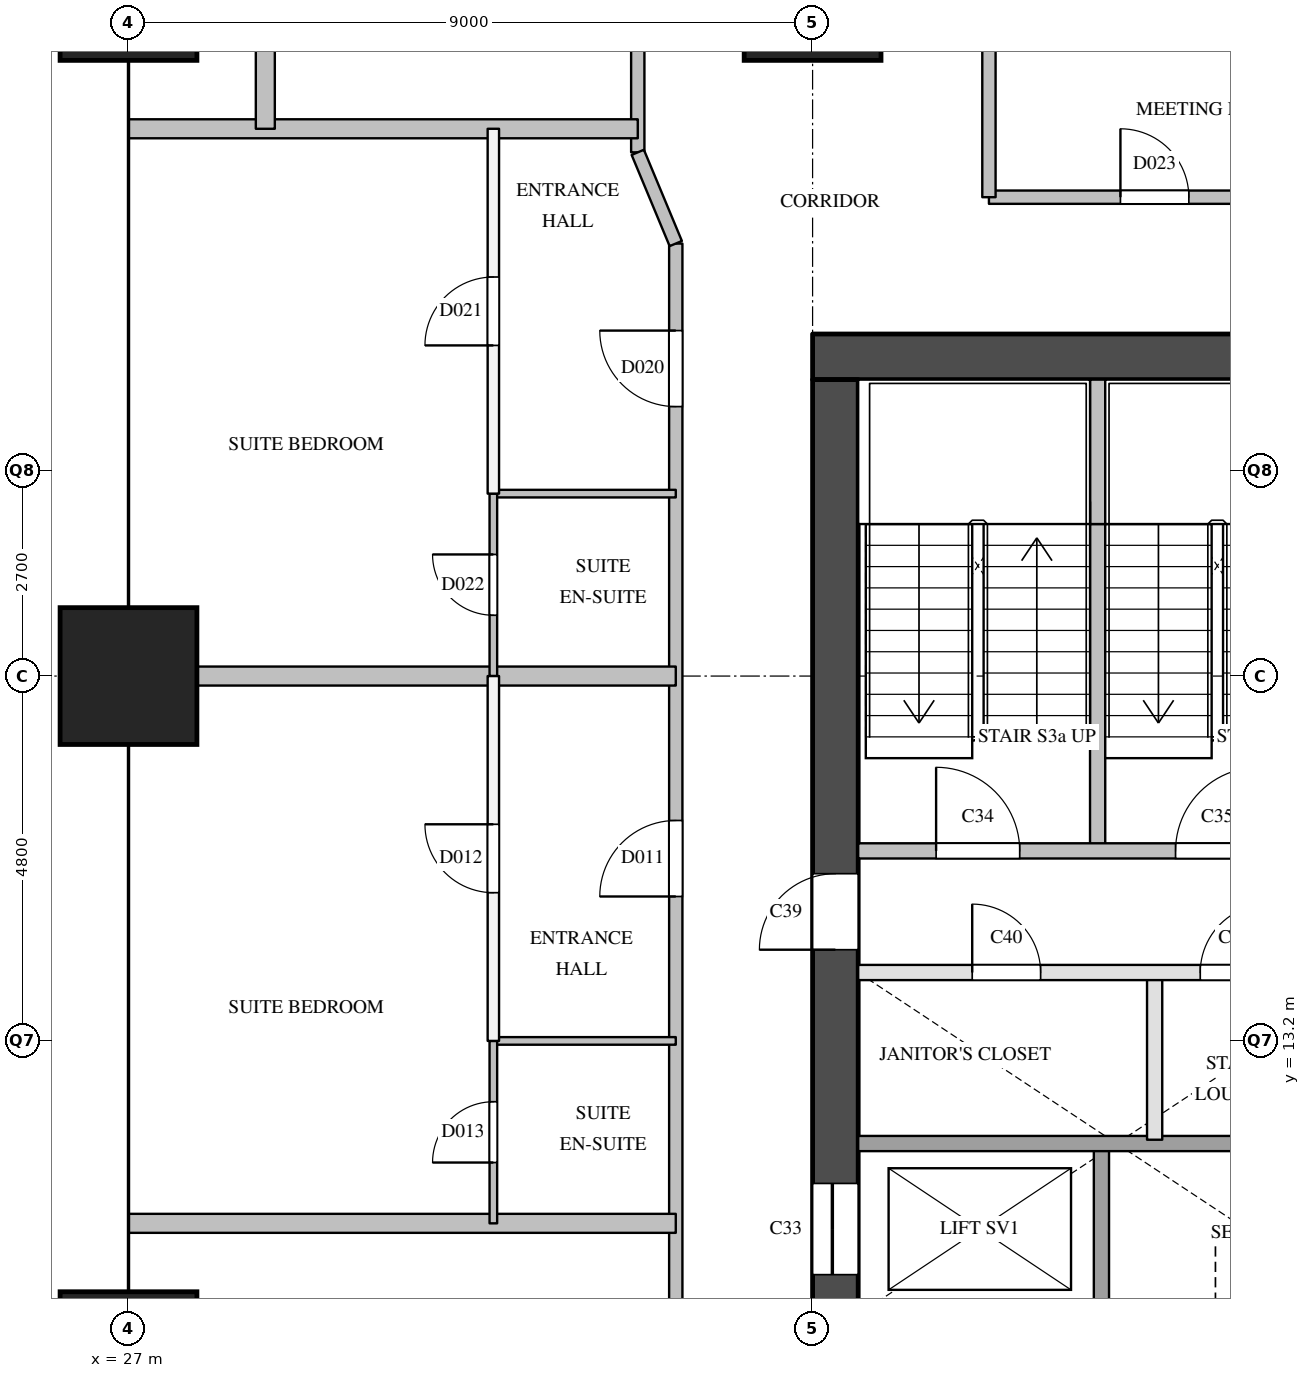
"""IFC4 building model, lengths in metres.
Left out: names, types, materials, properties, quantities, classifications, styles, units other than length and angle.
Written with IfcOpenShell. Run it as: python <this file> out.ifc"""

import sys

from ifc_helpers import new_model, si_unit, direction, frame, frame_2d, origin, origin_2d, place, context, subcontext, project, spatial, rectangle, extrude, element, fill, save


model = new_model("IFC4")
c1 = context("Model", 3, precision=1e-05, world=origin(), true_north=direction((0.0, 1.0)))
c2 = subcontext(c1, "Body", "Model", "MODEL_VIEW")
j1 = project(units=[si_unit("LENGTHUNIT", "METRE"), si_unit("PLANEANGLEUNIT", "RADIAN")], contexts=[c1])
p1 = place(None, origin())
s1 = spatial("IfcSite", under=j1, at=p1, CompositionType="ELEMENT")
p2 = place(p1, origin())
s2 = spatial("IfcBuilding", under=s1, at=p2, CompositionType="ELEMENT")
p3 = place(p2, frame((0.0, 0.0, 112.0)))
s3 = spatial("IfcBuildingStorey", under=s2, at=p3, CompositionType="ELEMENT", Elevation=112.0)
for number, where, z_axis, x_axis in (
    (1, (27.0, 9.0, 0.0), (0.0, 0.0, 1.0), (1.0, 0.0, 0.0)),
    (2, (27.0, 18.0, 0.0), (0.0, 0.0, 1.0), (1.0, 0.0, 0.0)),
    (3, (27.0, 27.0, 0.0), (0.0, 0.0, 1.0), (1.0, 0.0, 0.0)),
    (4, (36.0, 27.0, 0.0), (0.0, 0.0, 1.0), (1.0, 0.0, 0.0)),
):
    element("IfcColumn", number, at=place(p3, frame(where, z_axis=z_axis, x_axis=x_axis)), inside=s3, PredefinedType="COLUMN", context=c2, shape_type="SweptSolid", body=[
        extrude(rectangle(XDim=1.8, YDim=1.8, at=origin_2d()), origin(), (0.0, 0.0, 1.0), 3.8),
    ])
p4 = place(p3, frame((36.0, 22.2, 0.0), z_axis=(0.0, 0.0, 1.0), x_axis=(1.0, 0.0, 0.0)))
e5 = element("IfcWall", 5, at=p4, inside=s3, PredefinedType="SHEAR", context=c2, shape_type="SweptSolid", body=[
    extrude(rectangle(XDim=9.0, YDim=0.6, at=frame_2d((4.5, 0.0))), origin(), (0.0, 0.0, 1.0), 3.5),
])
p5 = place(p3, frame((36.3, 9.6, 0.0), z_axis=(0.0, 0.0, 1.0), x_axis=(0.0, 1.0, 0.0)))
e6 = element("IfcWall", 6, at=p5, inside=s3, PredefinedType="SHEAR", context=c2, shape_type="SweptSolid", body=[
    extrude(rectangle(XDim=12.3, YDim=0.6, at=frame_2d((6.15, 0.0))), origin(), (0.0, 0.0, 1.0), 3.5),
])
p6 = place(p5, frame((0.525, 0.0, 0.0)))
e7 = element("IfcOpeningElement", 7, at=p6, cuts=e6, PredefinedType="OPENING", context=c2, shape_type="SweptSolid", body=[
    extrude(rectangle(XDim=1.2, YDim=2.1, at=frame_2d((0.6, 1.05))), frame((0.0, 0.31, 0.0), z_axis=(0.0, -1.0, 0.0), x_axis=(1.0, 0.0, 0.0)), (0.0, 0.0, 1.0), 0.62),
])
p7 = place(p5, frame((4.8, 0.0, 0.0)))
e8 = element("IfcOpeningElement", 8, at=p7, cuts=e6, PredefinedType="OPENING", context=c2, shape_type="SweptSolid", body=[
    extrude(rectangle(XDim=1.0, YDim=2.1, at=frame_2d((0.5, 1.05))), frame((0.0, 0.31, 0.0), z_axis=(0.0, -1.0, 0.0), x_axis=(1.0, 0.0, 0.0)), (0.0, 0.0, 1.0), 0.62),
])
p8 = place(p3, frame((39.75, 15.7, 0.0), z_axis=(0.0, 0.0, 1.0), x_axis=(0.0, 1.0, 0.0)))
e9 = element("IfcWall", 9, at=p8, inside=s3, PredefinedType="SOLIDWALL", context=c2, shape_type="SweptSolid", body=[
    extrude(rectangle(XDim=4.3, YDim=0.2, at=frame_2d((2.15, 0.0))), origin(), (0.0, 0.0, 1.0), 3.5),
])
p9 = place(p3, frame((39.75, 20.0, 0.0), z_axis=(0.0, 0.0, 1.0), x_axis=(0.0, 1.0, 0.0)))
e10 = element("IfcWall", 10, at=p9, inside=s3, PredefinedType="SOLIDWALL", context=c2, shape_type="SweptSolid", body=[
    extrude(rectangle(XDim=1.9, YDim=0.2, at=frame_2d((0.95, 0.0))), origin(), (0.0, 0.0, 1.0), 3.5),
])
p10 = place(p3, frame((39.8, 9.6, 0.0), z_axis=(0.0, 0.0, 1.0), x_axis=(0.0, 1.0, 0.0)))
e11 = element("IfcWall", 11, at=p10, inside=s3, PredefinedType="SOLIDWALL", context=c2, shape_type="SweptSolid", body=[
    extrude(rectangle(XDim=2.3, YDim=0.2, at=frame_2d((1.15, 0.0))), origin(), (0.0, 0.0, 1.0), 3.5),
])
p11 = place(p3, frame((40.5, 11.9, 0.0), z_axis=(0.0, 0.0, 1.0), x_axis=(0.0, 1.0, 0.0)))
e12 = element("IfcWall", 12, at=p11, inside=s3, PredefinedType="PARTITIONING", context=c2, shape_type="SweptSolid", body=[
    extrude(rectangle(XDim=2.2, YDim=0.2, at=frame_2d((1.1, 0.0))), origin(), (0.0, 0.0, 1.0), 3.5),
])
p12 = place(p3, frame((36.6, 11.85, 0.0), z_axis=(0.0, 0.0, 1.0), x_axis=(1.0, 0.0, 0.0)))
e13 = element("IfcWall", 13, at=p12, inside=s3, PredefinedType="SOLIDWALL", context=c2, shape_type="SweptSolid", body=[
    extrude(rectangle(XDim=7.8, YDim=0.2, at=frame_2d((3.9, 0.0))), origin(), (0.0, 0.0, 1.0), 3.5),
])
p13 = place(p3, frame((36.6, 14.1, 0.0), z_axis=(0.0, 0.0, 1.0), x_axis=(1.0, 0.0, 0.0)))
e14 = element("IfcWall", 14, at=p13, inside=s3, PredefinedType="PARTITIONING", context=c2, shape_type="SweptSolid", body=[
    extrude(rectangle(XDim=6.0, YDim=0.2, at=frame_2d((3.0, 0.0))), origin(), (0.0, 0.0, 1.0), 3.5),
])
p14 = place(p13, frame((1.5, 0.0, 0.0)))
e15 = element("IfcOpeningElement", 15, at=p14, cuts=e14, PredefinedType="OPENING", context=c2, shape_type="SweptSolid", body=[
    extrude(rectangle(XDim=0.9, YDim=2.1, at=frame_2d((0.45, 1.05))), frame((0.0, 0.11, 0.0), z_axis=(0.0, -1.0, 0.0), x_axis=(1.0, 0.0, 0.0)), (0.0, 0.0, 1.0), 0.22),
])
p15 = place(p13, frame((4.5, 0.0, 0.0)))
e16 = element("IfcOpeningElement", 16, at=p15, cuts=e14, PredefinedType="OPENING", context=c2, shape_type="SweptSolid", body=[
    extrude(rectangle(XDim=0.9, YDim=2.1, at=frame_2d((0.45, 1.05))), frame((0.0, 0.11, 0.0), z_axis=(0.0, -1.0, 0.0), x_axis=(1.0, 0.0, 0.0)), (0.0, 0.0, 1.0), 0.22),
])
p16 = place(p3, frame((36.6, 15.7, 0.0), z_axis=(0.0, 0.0, 1.0), x_axis=(1.0, 0.0, 0.0)))
e17 = element("IfcWall", 17, at=p16, inside=s3, PredefinedType="SOLIDWALL", context=c2, shape_type="SweptSolid", body=[
    extrude(rectangle(XDim=6.3, YDim=0.2, at=frame_2d((3.15, 0.0))), origin(), (0.0, 0.0, 1.0), 3.5),
])
p17 = place(p16, frame((1.025, 0.0, 0.0)))
e18 = element("IfcOpeningElement", 18, at=p17, cuts=e17, PredefinedType="OPENING", context=c2, shape_type="SweptSolid", body=[
    extrude(rectangle(XDim=1.1, YDim=2.1, at=frame_2d((0.55, 1.05))), frame((0.0, 0.11, 0.0), z_axis=(0.0, -1.0, 0.0), x_axis=(1.0, 0.0, 0.0)), (0.0, 0.0, 1.0), 0.22),
])
p18 = place(p16, frame((4.175, 0.0, 0.0)))
e19 = element("IfcOpeningElement", 19, at=p18, cuts=e17, PredefinedType="OPENING", context=c2, shape_type="SweptSolid", body=[
    extrude(rectangle(XDim=1.1, YDim=2.1, at=frame_2d((0.55, 1.05))), frame((0.0, 0.11, 0.0), z_axis=(0.0, -1.0, 0.0), x_axis=(1.0, 0.0, 0.0)), (0.0, 0.0, 1.0), 0.22),
])
p19 = place(p3, frame((38.32, 24.3, 0.0), z_axis=(0.0, 0.0, 1.0), x_axis=(1.0, 0.0, 0.0)))
e20 = element("IfcWall", 20, at=p19, inside=s3, PredefinedType="PARTITIONING", context=c2, shape_type="SweptSolid", body=[
    extrude(rectangle(XDim=4.36, YDim=0.175, at=frame_2d((2.18, 0.0))), origin(), (0.0, 0.0, 1.0), 3.5),
])
p20 = place(p19, frame((1.73, 0.0, 0.0)))
e21 = element("IfcOpeningElement", 21, at=p20, cuts=e20, PredefinedType="OPENING", context=c2, shape_type="SweptSolid", body=[
    extrude(rectangle(XDim=0.9, YDim=2.1, at=frame_2d((0.45, 1.05))), frame((0.0, 0.097, 0.0), z_axis=(0.0, -1.0, 0.0), x_axis=(1.0, 0.0, 0.0)), (0.0, 0.0, 1.0), 0.195),
])
p21 = place(p3, frame((33.7, 24.89, 0.0), z_axis=(0.0, 0.0, 1.0), x_axis=(0.0, 1.0, 0.0)))
e22 = element("IfcWall", 22, at=p21, inside=s3, PredefinedType="PARTITIONING", context=c2, shape_type="SweptSolid", body=[
    extrude(rectangle(XDim=3.03, YDim=0.175, at=frame_2d((1.515, 0.0))), origin(), (0.0, 0.0, 1.0), 2.5),
])
p22 = place(p3, frame((34.2, 7.2, 0.0), z_axis=(0.0, 0.0, 1.0), x_axis=(0.0, 1.0, 0.0)))
e23 = element("IfcWall", 23, at=p22, inside=s3, PredefinedType="PARTITIONING", context=c2, shape_type="SweptSolid", body=[
    extrude(rectangle(XDim=16.49, YDim=0.175, at=frame_2d((8.245, 0.0))), origin(), (0.0, 0.0, 1.0), 3.5),
])
p23 = place(p22, frame((1.35, 0.0, 0.0)))
e24 = element("IfcOpeningElement", 24, at=p23, cuts=e23, PredefinedType="OPENING", context=c2, shape_type="SweptSolid", body=[
    extrude(rectangle(XDim=0.9, YDim=2.1, at=frame_2d((0.45, 1.05))), frame((0.0, 0.097, 0.0), z_axis=(0.0, -1.0, 0.0), x_axis=(1.0, 0.0, 0.0)), (0.0, 0.0, 1.0), 0.195),
])
p24 = place(p22, frame((7.9, 0.0, 0.0)))
e25 = element("IfcOpeningElement", 25, at=p24, cuts=e23, PredefinedType="OPENING", context=c2, shape_type="SweptSolid", body=[
    extrude(rectangle(XDim=1.0, YDim=2.1, at=frame_2d((0.5, 1.05))), frame((0.0, 0.097, 0.0), z_axis=(0.0, -1.0, 0.0), x_axis=(1.0, 0.0, 0.0)), (0.0, 0.0, 1.0), 0.195),
])
p25 = place(p22, frame((14.345, 0.0, 0.0)))
e26 = element("IfcOpeningElement", 26, at=p25, cuts=e23, PredefinedType="OPENING", context=c2, shape_type="SweptSolid", body=[
    extrude(rectangle(XDim=1.0, YDim=2.1, at=frame_2d((0.5, 1.05))), frame((0.0, 0.097, 0.0), z_axis=(0.0, -1.0, 0.0), x_axis=(1.0, 0.0, 0.0)), (0.0, 0.0, 1.0), 0.195),
])
p26 = place(p3, frame((38.32, 24.3, 0.0), z_axis=(0.0, 0.0, 1.0), x_axis=(0.0, 1.0, 0.0)))
e27 = element("IfcWall", 27, at=p26, inside=s3, PredefinedType="PARTITIONING", context=c2, shape_type="SweptSolid", body=[
    extrude(rectangle(XDim=2.4, YDim=0.175, at=frame_2d((1.2, 0.0))), origin(), (0.0, 0.0, 1.0), 2.5),
])
p27 = place(p3, frame((31.8, 13.2, 0.0), z_axis=(0.0, 0.0, 1.0), x_axis=(0.0, 1.0, 0.0)))
e28 = element("IfcWall", 28, at=p27, inside=s3, PredefinedType="PARTITIONING", context=c2, shape_type="SweptSolid", body=[
    extrude(rectangle(XDim=4.8, YDim=0.15, at=frame_2d((2.4, 0.0))), origin(), (0.0, 0.0, 1.0), 3.5),
])
p28 = place(p27, frame((1.95, 0.0, 0.0)))
e29 = element("IfcOpeningElement", 29, at=p28, cuts=e28, PredefinedType="OPENING", context=c2, shape_type="SweptSolid", body=[
    extrude(rectangle(XDim=0.9, YDim=2.1, at=frame_2d((0.45, 1.05))), frame((0.0, 0.085, 0.0), z_axis=(0.0, -1.0, 0.0), x_axis=(1.0, 0.0, 0.0)), (0.0, 0.0, 1.0), 0.17),
])
p29 = place(p3, frame((31.8, 20.4, 0.0), z_axis=(0.0, 0.0, 1.0), x_axis=(0.0, 1.0, 0.0)))
e30 = element("IfcWall", 30, at=p29, inside=s3, PredefinedType="PARTITIONING", context=c2, shape_type="SweptSolid", body=[
    extrude(rectangle(XDim=4.8, YDim=0.15, at=frame_2d((2.4, 0.0))), origin(), (0.0, 0.0, 1.0), 3.5),
])
p30 = place(p29, frame((1.95, 0.0, 0.0)))
e31 = element("IfcOpeningElement", 31, at=p30, cuts=e30, PredefinedType="OPENING", context=c2, shape_type="SweptSolid", body=[
    extrude(rectangle(XDim=0.9, YDim=2.1, at=frame_2d((0.45, 1.05))), frame((0.0, 0.085, 0.0), z_axis=(0.0, -1.0, 0.0), x_axis=(1.0, 0.0, 0.0)), (0.0, 0.0, 1.0), 0.17),
])
p31 = place(p3, frame((27.0, 10.8, 0.0), z_axis=(0.0, 0.0, 1.0), x_axis=(1.0, 0.0, 0.0)))
e32 = element("IfcWall", 32, at=p31, inside=s3, PredefinedType="PARTITIONING", context=c2, shape_type="SweptSolid", body=[
    extrude(rectangle(XDim=7.2, YDim=0.25, at=frame_2d((3.6, 0.0))), origin(), (0.0, 0.0, 1.0), 2.5),
])
p32 = place(p3, frame((27.0, 18.0, 0.0), z_axis=(0.0, 0.0, 1.0), x_axis=(1.0, 0.0, 0.0)))
e33 = element("IfcWall", 33, at=p32, inside=s3, PredefinedType="PARTITIONING", context=c2, shape_type="SweptSolid", body=[
    extrude(rectangle(XDim=7.2, YDim=0.25, at=frame_2d((3.6, 0.0))), origin(), (0.0, 0.0, 1.0), 3.5),
])
p33 = place(p3, frame((27.0, 25.2, 0.0), z_axis=(0.0, 0.0, 1.0), x_axis=(1.0, 0.0, 0.0)))
e34 = element("IfcWall", 34, at=p33, inside=s3, PredefinedType="PARTITIONING", context=c2, shape_type="SweptSolid", body=[
    extrude(rectangle(XDim=6.7, YDim=0.25, at=frame_2d((3.35, 0.0))), origin(), (0.0, 0.0, 1.0), 2.5),
])
p34 = place(p3, frame((28.8, 25.2, 0.0), z_axis=(0.0, 0.0, 1.0), x_axis=(0.0, 1.0, 0.0)))
e35 = element("IfcWall", 35, at=p34, inside=s3, PredefinedType="PARTITIONING", context=c2, shape_type="SweptSolid", body=[
    extrude(rectangle(XDim=10.8, YDim=0.25, at=frame_2d((5.4, 0.0))), origin(), (0.0, 0.0, 1.0), 2.5),
])
for number, where, z_axis, x_axis in (
    (36, (31.8, 13.2, 0.0), (0.0, 0.0, 1.0), (1.0, 0.0, 0.0)),
    (37, (31.8, 20.4, 0.0), (0.0, 0.0, 1.0), (1.0, 0.0, 0.0)),
):
    element("IfcWall", number, at=place(p3, frame(where, z_axis=z_axis, x_axis=x_axis)), inside=s3, PredefinedType="PARTITIONING", context=c2, shape_type="SweptSolid", body=[
        extrude(rectangle(XDim=2.4, YDim=0.1, at=frame_2d((1.2, 0.0))), origin(), (0.0, 0.0, 1.0), 3.5),
    ])
p35 = place(p3, frame((31.8, 10.8, 0.0), z_axis=(0.0, 0.0, 1.0), x_axis=(0.0, 1.0, 0.0)))
e38 = element("IfcWall", 38, at=p35, inside=s3, PredefinedType="PARTITIONING", context=c2, shape_type="SweptSolid", body=[
    extrude(rectangle(XDim=2.4, YDim=0.1, at=frame_2d((1.2, 0.0))), origin(), (0.0, 0.0, 1.0), 3.5),
])
p36 = place(p35, frame((0.8, 0.0, 0.0)))
e39 = element("IfcOpeningElement", 39, at=p36, cuts=e38, PredefinedType="OPENING", context=c2, shape_type="SweptSolid", body=[
    extrude(rectangle(XDim=0.8, YDim=2.1, at=frame_2d((0.4, 1.05))), frame((0.0, 0.06, 0.0), z_axis=(0.0, -1.0, 0.0), x_axis=(1.0, 0.0, 0.0)), (0.0, 0.0, 1.0), 0.12),
])
p37 = place(p3, frame((31.8, 18.0, 0.0), z_axis=(0.0, 0.0, 1.0), x_axis=(0.0, 1.0, 0.0)))
e40 = element("IfcWall", 40, at=p37, inside=s3, PredefinedType="PARTITIONING", context=c2, shape_type="SweptSolid", body=[
    extrude(rectangle(XDim=2.4, YDim=0.1, at=frame_2d((1.2, 0.0))), origin(), (0.0, 0.0, 1.0), 3.5),
])
p38 = place(p37, frame((0.8, 0.0, 0.0)))
e41 = element("IfcOpeningElement", 41, at=p38, cuts=e40, PredefinedType="OPENING", context=c2, shape_type="SweptSolid", body=[
    extrude(rectangle(XDim=0.8, YDim=2.1, at=frame_2d((0.4, 1.05))), frame((0.0, 0.06, 0.0), z_axis=(0.0, -1.0, 0.0), x_axis=(1.0, 0.0, 0.0)), (0.0, 0.0, 1.0), 0.12),
])
p39 = place(p3, frame((34.2, 23.69, 0.0), z_axis=(0.0, 0.0, 1.0), x_axis=(-0.384628719983, 0.923071366561, 0.0)))
e42 = element("IfcWall", 42, at=p39, inside=s3, PredefinedType="PARTITIONING", context=c2, shape_type="SweptSolid", body=[
    extrude(rectangle(XDim=1.3, YDim=0.175, at=frame_2d((0.65, 0.0))), origin(), (0.0, 0.0, 1.0), 3.5),
])
p40 = place(p6, origin())
e43 = element("IfcDoor", 43, at=p40, inside=s3, OperationType="SLIDING_TO_LEFT", PredefinedType="DOOR", context=c2, shape_type="SweptSolid", body=[
    extrude(rectangle(XDim=1.2, YDim=2.1, at=frame_2d((0.6, 1.05))), frame((0.0, 0.025, 0.0), z_axis=(0.0, -1.0, 0.0), x_axis=(1.0, 0.0, 0.0)), (0.0, 0.0, 1.0), 0.05),
])
fill(e7, e43)
p41 = place(p17, origin())
e44 = element("IfcDoor", 44, at=p41, inside=s3, OperationType="SINGLE_SWING_LEFT", PredefinedType="DOOR", context=c2, shape_type="SweptSolid", body=[
    extrude(rectangle(XDim=1.1, YDim=2.1, at=frame_2d((0.55, 1.05))), frame((0.0, 0.025, 0.0), z_axis=(0.0, -1.0, 0.0), x_axis=(1.0, 0.0, 0.0)), (0.0, 0.0, 1.0), 0.05),
])
fill(e18, e44)
p42 = place(p18, origin())
e45 = element("IfcDoor", 45, at=p42, inside=s3, OperationType="SINGLE_SWING_RIGHT", PredefinedType="DOOR", context=c2, shape_type="SweptSolid", body=[
    extrude(rectangle(XDim=1.1, YDim=2.1, at=frame_2d((0.55, 1.05))), frame((0.0, 0.025, 0.0), z_axis=(0.0, -1.0, 0.0), x_axis=(1.0, 0.0, 0.0)), (0.0, 0.0, 1.0), 0.05),
])
fill(e19, e45)
p43 = place(p7, origin())
e46 = element("IfcDoor", 46, at=p43, inside=s3, OperationType="SINGLE_SWING_LEFT", PredefinedType="DOOR", context=c2, shape_type="SweptSolid", body=[
    extrude(rectangle(XDim=1.0, YDim=2.1, at=frame_2d((0.5, 1.05))), frame((0.0, 0.025, 0.0), z_axis=(0.0, -1.0, 0.0), x_axis=(1.0, 0.0, 0.0)), (0.0, 0.0, 1.0), 0.05),
])
fill(e8, e46)
p44 = place(p14, origin())
e47 = element("IfcDoor", 47, at=p44, inside=s3, OperationType="SINGLE_SWING_LEFT", PredefinedType="DOOR", context=c2, shape_type="SweptSolid", body=[
    extrude(rectangle(XDim=0.9, YDim=2.1, at=frame_2d((0.45, 1.05))), frame((0.0, 0.025, 0.0), z_axis=(0.0, -1.0, 0.0), x_axis=(1.0, 0.0, 0.0)), (0.0, 0.0, 1.0), 0.05),
])
fill(e15, e47)
p45 = place(p15, origin())
e48 = element("IfcDoor", 48, at=p45, inside=s3, OperationType="SINGLE_SWING_RIGHT", PredefinedType="DOOR", context=c2, shape_type="SweptSolid", body=[
    extrude(rectangle(XDim=0.9, YDim=2.1, at=frame_2d((0.45, 1.05))), frame((0.0, 0.025, 0.0), z_axis=(0.0, -1.0, 0.0), x_axis=(1.0, 0.0, 0.0)), (0.0, 0.0, 1.0), 0.05),
])
fill(e16, e48)
p46 = place(p24, origin())
e49 = element("IfcDoor", 49, at=p46, inside=s3, OperationType="SINGLE_SWING_LEFT", PredefinedType="DOOR", context=c2, shape_type="SweptSolid", body=[
    extrude(rectangle(XDim=1.0, YDim=2.1, at=frame_2d((0.5, 1.05))), frame((0.0, 0.025, 0.0), z_axis=(0.0, -1.0, 0.0), x_axis=(1.0, 0.0, 0.0)), (0.0, 0.0, 1.0), 0.05),
])
fill(e25, e49)
p47 = place(p28, origin())
e50 = element("IfcDoor", 50, at=p47, inside=s3, OperationType="SINGLE_SWING_RIGHT", PredefinedType="DOOR", context=c2, shape_type="SweptSolid", body=[
    extrude(rectangle(XDim=0.9, YDim=2.1, at=frame_2d((0.45, 1.05))), frame((0.0, 0.025, 0.0), z_axis=(0.0, -1.0, 0.0), x_axis=(1.0, 0.0, 0.0)), (0.0, 0.0, 1.0), 0.05),
])
fill(e29, e50)
p48 = place(p36, origin())
e51 = element("IfcDoor", 51, at=p48, inside=s3, OperationType="SINGLE_SWING_LEFT", PredefinedType="DOOR", context=c2, shape_type="SweptSolid", body=[
    extrude(rectangle(XDim=0.8, YDim=2.1, at=frame_2d((0.4, 1.05))), frame((0.0, 0.025, 0.0), z_axis=(0.0, -1.0, 0.0), x_axis=(1.0, 0.0, 0.0)), (0.0, 0.0, 1.0), 0.05),
])
fill(e39, e51)
p49 = place(p25, origin())
e52 = element("IfcDoor", 52, at=p49, inside=s3, OperationType="SINGLE_SWING_RIGHT", PredefinedType="DOOR", context=c2, shape_type="SweptSolid", body=[
    extrude(rectangle(XDim=1.0, YDim=2.1, at=frame_2d((0.5, 1.05))), frame((0.0, 0.025, 0.0), z_axis=(0.0, -1.0, 0.0), x_axis=(1.0, 0.0, 0.0)), (0.0, 0.0, 1.0), 0.05),
])
fill(e26, e52)
p50 = place(p30, origin())
e53 = element("IfcDoor", 53, at=p50, inside=s3, OperationType="SINGLE_SWING_LEFT", PredefinedType="DOOR", context=c2, shape_type="SweptSolid", body=[
    extrude(rectangle(XDim=0.9, YDim=2.1, at=frame_2d((0.45, 1.05))), frame((0.0, 0.025, 0.0), z_axis=(0.0, -1.0, 0.0), x_axis=(1.0, 0.0, 0.0)), (0.0, 0.0, 1.0), 0.05),
])
fill(e31, e53)
p51 = place(p38, origin())
e54 = element("IfcDoor", 54, at=p51, inside=s3, OperationType="SINGLE_SWING_RIGHT", PredefinedType="DOOR", context=c2, shape_type="SweptSolid", body=[
    extrude(rectangle(XDim=0.8, YDim=2.1, at=frame_2d((0.4, 1.05))), frame((0.0, 0.025, 0.0), z_axis=(0.0, -1.0, 0.0), x_axis=(1.0, 0.0, 0.0)), (0.0, 0.0, 1.0), 0.05),
])
fill(e41, e54)
p52 = place(p20, origin())
e55 = element("IfcDoor", 55, at=p52, inside=s3, OperationType="SINGLE_SWING_LEFT", PredefinedType="DOOR", context=c2, shape_type="SweptSolid", body=[
    extrude(rectangle(XDim=0.9, YDim=2.1, at=frame_2d((0.45, 1.05))), frame((0.0, 0.025, 0.0), z_axis=(0.0, -1.0, 0.0), x_axis=(1.0, 0.0, 0.0)), (0.0, 0.0, 1.0), 0.05),
])
fill(e21, e55)
save(model, sys.argv[1])
